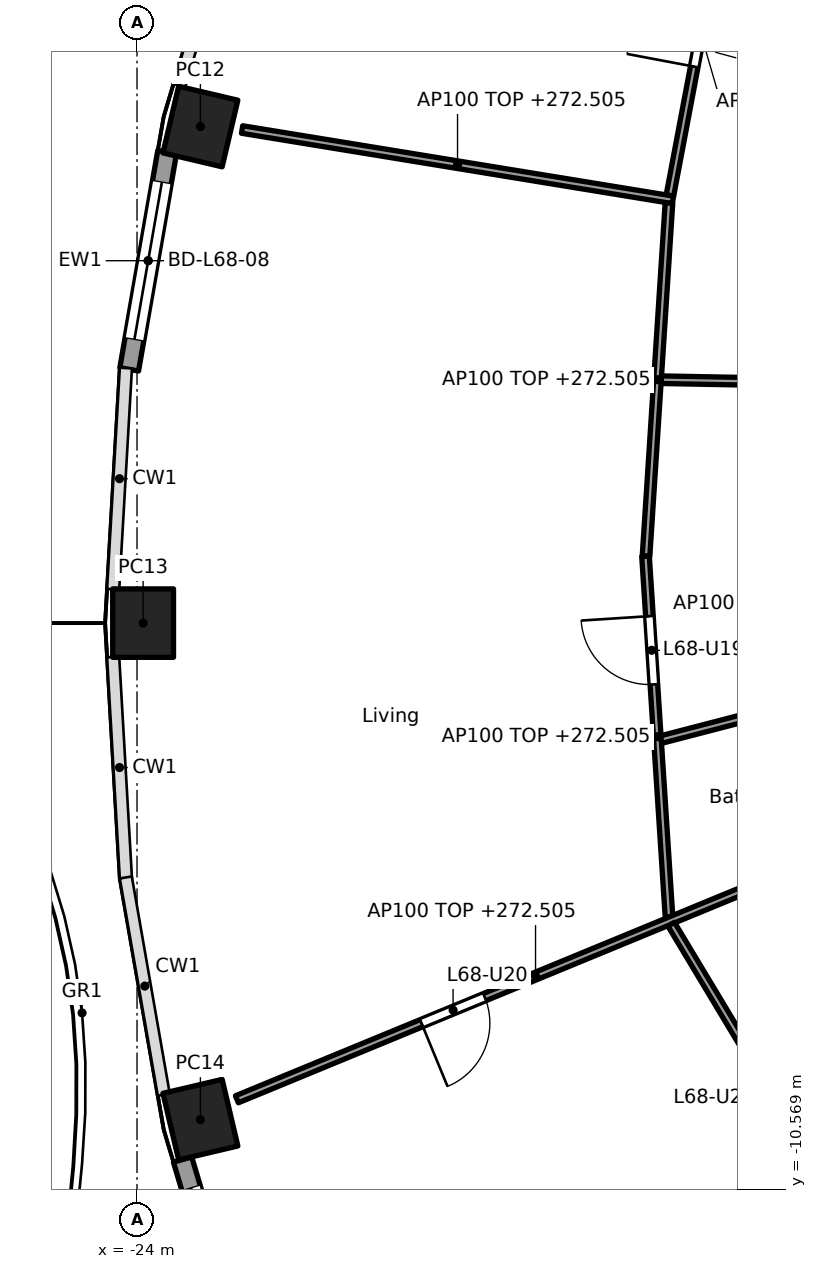
"""IFC4 building model, lengths in metres.
Left out: names, types, materials, properties, quantities, classifications, styles, units other than length and angle.
Written with IfcOpenShell. Run it as: python <this file> out.ifc"""

import sys

from ifc_helpers import new_model, si_unit, direction, frame, frame_2d, origin, origin_2d, place, context, subcontext, project, spatial, rectangle, hollow_rectangle, extrude, element, fill, save


model = new_model("IFC4")
c1 = context("Model", 3, precision=1e-05, world=origin(), true_north=direction((0.0, 1.0)))
c2 = subcontext(c1, "Body", "Model", "MODEL_VIEW")
j1 = project(units=[si_unit("LENGTHUNIT", "METRE"), si_unit("PLANEANGLEUNIT", "RADIAN")], contexts=[c1])
p1 = place(None, origin())
s1 = spatial("IfcSite", under=j1, at=p1, CompositionType="ELEMENT")
p2 = place(p1, origin())
s2 = spatial("IfcBuilding", under=s1, at=p2, CompositionType="ELEMENT")
p3 = place(p2, frame((0.0, 0.0, 269.6)))
s3 = spatial("IfcBuildingStorey", under=s2, at=p3, CompositionType="ELEMENT", Elevation=269.6)
for number, where, z_axis, x_axis in (
    (1, (-23.166, 3.415, 0.0), (0.0, 0.0, 1.0), (-0.229, -0.973, 0.0)),
    (2, (-23.92, -3.118, 0.0), (0.0, 0.0, 1.0), (0.0, -1.0, 0.0)),
    (3, (-23.166, -9.65, 0.0), (0.0, 0.0, 1.0), (0.229, -0.973, 0.0)),
):
    element("IfcColumn", number, at=place(p3, frame(where, z_axis=z_axis, x_axis=x_axis)), inside=s3, PredefinedType="COLUMN", context=c2, shape_type="SweptSolid", body=[
        extrude(hollow_rectangle(XDim=0.9, YDim=0.8, WallThickness=0.028, at=origin_2d()), origin(), (0.0, 0.0, 1.0), 3.7),
    ])
p4 = place(p3, frame((-24.103, 0.22, 0.0), z_axis=(0.0, 0.0, 1.0), x_axis=(0.172182411767, 0.985065082661, 0.0)))
e4 = element("IfcWall", 4, at=p4, inside=s3, PredefinedType="SOLIDWALL", context=c2, shape_type="SweptSolid", body=[
    extrude(rectangle(XDim=2.903, YDim=0.25, at=frame_2d((1.451, 0.0))), origin(), (0.0, 0.0, 1.0), 3.44),
])
p5 = place(p4, frame((0.401, 0.0, 0.0)))
e5 = element("IfcOpeningElement", 5, at=p5, cuts=e4, PredefinedType="OPENING", context=c2, shape_type="SweptSolid", body=[
    extrude(rectangle(XDim=2.1, YDim=2.4, at=frame_2d((1.05, 1.2))), frame((0.0, 0.135, 0.0), z_axis=(0.0, -1.0, 0.0), x_axis=(1.0, 0.0, 0.0)), (0.0, 0.0, 1.0), 0.27),
])
p6 = place(p3, frame((-22.578, -12.932, 0.0), z_axis=(0.0, 0.0, 1.0), x_axis=(-0.285899456462, 0.958259620768, 0.0)))
e6 = element("IfcWall", 6, at=p6, inside=s3, PredefinedType="SOLIDWALL", context=c2, shape_type="SweptSolid", body=[
    extrude(rectangle(XDim=2.877, YDim=0.25, at=frame_2d((1.438, 0.0))), origin(), (0.0, 0.0, 1.0), 3.44),
])
p7 = place(p6, frame((0.389, 0.0, 0.0)))
e7 = element("IfcOpeningElement", 7, at=p7, cuts=e6, PredefinedType="OPENING", context=c2, shape_type="SweptSolid", body=[
    extrude(rectangle(XDim=2.1, YDim=2.4, at=frame_2d((1.05, 1.2))), frame((0.0, 0.135, 0.0), z_axis=(0.0, -1.0, 0.0), x_axis=(1.0, 0.0, 0.0)), (0.0, 0.0, 1.0), 0.27),
])
p8 = place(p3, frame((-16.181, 6.783, 0.0), z_axis=(0.0, 0.0, 1.0), x_axis=(-0.185670583745, -0.982612046706, 0.0)))
e8 = element("IfcWall", 8, at=p8, inside=s3, PredefinedType="PARTITIONING", context=c2, shape_type="SweptSolid", body=[
    extrude(rectangle(XDim=4.351, YDim=0.1, at=frame_2d((2.176, 0.0))), origin(), (0.0, 0.0, 1.0), 2.905),
])
p9 = place(p8, frame((1.726, 0.0, 0.0)))
e9 = element("IfcOpeningElement", 9, at=p9, cuts=e8, PredefinedType="OPENING", context=c2, shape_type="SweptSolid", body=[
    extrude(rectangle(XDim=0.9, YDim=2.1, at=frame_2d((0.45, 1.05))), frame((0.0, 0.06, 0.0), z_axis=(0.0, -1.0, 0.0), x_axis=(1.0, 0.0, 0.0)), (0.0, 0.0, 1.0), 0.12),
])
p10 = place(p3, frame((-16.949, 2.451, 0.0), z_axis=(0.0, 0.0, 1.0), x_axis=(-0.986937570833, 0.161103169673, 0.0)))
e10 = element("IfcWall", 10, at=p10, inside=s3, PredefinedType="PARTITIONING", context=c2, shape_type="SweptSolid", body=[
    extrude(rectangle(XDim=5.743, YDim=0.1, at=frame_2d((2.872, 0.0))), origin(), (0.0, 0.0, 1.0), 2.905),
])
p11 = place(p3, frame((-17.002, 2.409, 0.0), z_axis=(0.0, 0.0, 1.0), x_axis=(-0.064855550758, -0.997894662545, 0.0)))
e11 = element("IfcWall", 11, at=p11, inside=s3, PredefinedType="PARTITIONING", context=c2, shape_type="SweptSolid", body=[
    extrude(rectangle(XDim=4.656, YDim=0.1, at=frame_2d((2.328, 0.0))), origin(), (0.0, 0.0, 1.0), 2.905),
])
p12 = place(p3, frame((-12.665, 0.002, 0.0), z_axis=(0.0, 0.0, 1.0), x_axis=(-0.999827178165, 0.018590691287, 0.0)))
e12 = element("IfcWall", 12, at=p12, inside=s3, PredefinedType="PARTITIONING", context=c2, shape_type="SweptSolid", body=[
    extrude(rectangle(XDim=4.439, YDim=0.1, at=frame_2d((2.219, 0.0))), origin(), (0.0, 0.0, 1.0), 2.762),
])
p13 = place(p12, frame((1.769, 0.0, 0.0)))
e13 = element("IfcOpeningElement", 13, at=p13, cuts=e12, PredefinedType="OPENING", context=c2, shape_type="SweptSolid", body=[
    extrude(rectangle(XDim=0.9, YDim=2.1, at=frame_2d((0.45, 1.05))), frame((0.0, 0.06, 0.0), z_axis=(0.0, -1.0, 0.0), x_axis=(1.0, 0.0, 0.0)), (0.0, 0.0, 1.0), 0.12),
])
p14 = place(p3, frame((-17.31, -2.238, 0.0), z_axis=(0.0, 0.0, 1.0), x_axis=(0.064949202176, -0.997888571503, 0.0)))
e14 = element("IfcWall", 14, at=p14, inside=s3, PredefinedType="PARTITIONING", context=c2, shape_type="SweptSolid", body=[
    extrude(rectangle(XDim=4.759, YDim=0.1, at=frame_2d((2.379, 0.0))), origin(), (0.0, 0.0, 1.0), 2.905),
])
p15 = place(p14, frame((0.79, 0.0, 0.0)))
e15 = element("IfcOpeningElement", 15, at=p15, cuts=e14, PredefinedType="OPENING", context=c2, shape_type="SweptSolid", body=[
    extrude(rectangle(XDim=0.9, YDim=2.1, at=frame_2d((0.45, 1.05))), frame((0.0, 0.06, 0.0), z_axis=(0.0, -1.0, 0.0), x_axis=(1.0, 0.0, 0.0)), (0.0, 0.0, 1.0), 0.12),
])
p16 = place(p3, frame((-12.662, -3.495, 0.0), z_axis=(0.0, 0.0, 1.0), x_axis=(-0.967834941053, -0.251586022817, 0.0)))
e16 = element("IfcWall", 16, at=p16, inside=s3, PredefinedType="PARTITIONING", context=c2, shape_type="SweptSolid", body=[
    extrude(rectangle(XDim=4.59, YDim=0.1, at=frame_2d((2.295, 0.0))), origin(), (0.0, 0.0, 1.0), 2.762),
])
p17 = place(p16, frame((0.5, 0.0, 0.0)))
e17 = element("IfcOpeningElement", 17, at=p17, cuts=e16, PredefinedType="OPENING", context=c2, shape_type="SweptSolid", body=[
    extrude(rectangle(XDim=0.9, YDim=2.1, at=frame_2d((0.45, 1.05))), frame((0.0, 0.06, 0.0), z_axis=(0.0, -1.0, 0.0), x_axis=(1.0, 0.0, 0.0)), (0.0, 0.0, 1.0), 0.12),
])
p18 = place(p3, frame((-14.828, -6.142, 0.0), z_axis=(0.0, 0.0, 1.0), x_axis=(-0.924478087429, -0.381235184451, 0.0)))
e18 = element("IfcWall", 18, at=p18, inside=s3, PredefinedType="PARTITIONING", context=c2, shape_type="SweptSolid", body=[
    extrude(rectangle(XDim=8.499, YDim=0.1, at=frame_2d((4.25, 0.0))), origin(), (0.0, 0.0, 1.0), 2.905),
])
p19 = place(p18, frame((4.973, 0.0, 0.0)))
e19 = element("IfcOpeningElement", 19, at=p19, cuts=e18, PredefinedType="OPENING", context=c2, shape_type="SweptSolid", body=[
    extrude(rectangle(XDim=0.9, YDim=2.1, at=frame_2d((0.45, 1.05))), frame((0.0, 0.06, 0.0), z_axis=(0.0, -1.0, 0.0), x_axis=(1.0, 0.0, 0.0)), (0.0, 0.0, 1.0), 0.12),
])
p20 = place(p3, frame((-16.972, -7.08, 0.0), z_axis=(0.0, 0.0, 1.0), x_axis=(0.514989049311, -0.857196756346, 0.0)))
e20 = element("IfcWall", 20, at=p20, inside=s3, PredefinedType="PARTITIONING", context=c2, shape_type="SweptSolid", body=[
    extrude(rectangle(XDim=4.512, YDim=0.1, at=frame_2d((2.256, 0.0))), origin(), (0.0, 0.0, 1.0), 2.905),
])
p21 = place(p20, frame((1.806, 0.0, 0.0)))
e21 = element("IfcOpeningElement", 21, at=p21, cuts=e20, PredefinedType="OPENING", context=c2, shape_type="SweptSolid", body=[
    extrude(rectangle(XDim=0.9, YDim=2.1, at=frame_2d((0.45, 1.05))), frame((0.0, 0.06, 0.0), z_axis=(0.0, -1.0, 0.0), x_axis=(1.0, 0.0, 0.0)), (0.0, 0.0, 1.0), 0.12),
])
p22 = place(p5, origin())
e22 = element("IfcDoor", 22, at=p22, inside=s3, OperationType="SLIDING_TO_LEFT", PredefinedType="DOOR", context=c2, shape_type="SweptSolid", body=[
    extrude(rectangle(XDim=2.1, YDim=2.4, at=frame_2d((1.05, 1.2))), frame((0.0, 0.025, 0.0), z_axis=(0.0, -1.0, 0.0), x_axis=(1.0, 0.0, 0.0)), (0.0, 0.0, 1.0), 0.05),
])
fill(e5, e22)
p23 = place(p7, origin())
e23 = element("IfcDoor", 23, at=p23, inside=s3, OperationType="SLIDING_TO_LEFT", PredefinedType="DOOR", context=c2, shape_type="SweptSolid", body=[
    extrude(rectangle(XDim=2.1, YDim=2.4, at=frame_2d((1.05, 1.2))), frame((0.0, 0.025, 0.0), z_axis=(0.0, -1.0, 0.0), x_axis=(1.0, 0.0, 0.0)), (0.0, 0.0, 1.0), 0.05),
])
fill(e7, e23)
p24 = place(p9, frame((0.9, 0.0, 0.0), x_axis=(-1.0, 0.0, 0.0)))
e24 = element("IfcDoor", 24, at=p24, inside=s3, OperationType="SINGLE_SWING_LEFT", PredefinedType="DOOR", context=c2, shape_type="SweptSolid", body=[
    extrude(rectangle(XDim=0.9, YDim=2.1, at=frame_2d((0.45, 1.05))), frame((0.0, 0.025, 0.0), z_axis=(0.0, -1.0, 0.0), x_axis=(1.0, 0.0, 0.0)), (0.0, 0.0, 1.0), 0.05),
])
fill(e9, e24)
p25 = place(p15, frame((0.9, 0.0, 0.0), x_axis=(-1.0, 0.0, 0.0)))
e25 = element("IfcDoor", 25, at=p25, inside=s3, OperationType="SINGLE_SWING_RIGHT", PredefinedType="DOOR", context=c2, shape_type="SweptSolid", body=[
    extrude(rectangle(XDim=0.9, YDim=2.1, at=frame_2d((0.45, 1.05))), frame((0.0, 0.025, 0.0), z_axis=(0.0, -1.0, 0.0), x_axis=(1.0, 0.0, 0.0)), (0.0, 0.0, 1.0), 0.05),
])
fill(e15, e25)
p26 = place(p19, origin())
e26 = element("IfcDoor", 26, at=p26, inside=s3, OperationType="SINGLE_SWING_RIGHT", PredefinedType="DOOR", context=c2, shape_type="SweptSolid", body=[
    extrude(rectangle(XDim=0.9, YDim=2.1, at=frame_2d((0.45, 1.05))), frame((0.0, 0.025, 0.0), z_axis=(0.0, -1.0, 0.0), x_axis=(1.0, 0.0, 0.0)), (0.0, 0.0, 1.0), 0.05),
])
fill(e19, e26)
save(model, sys.argv[1])
